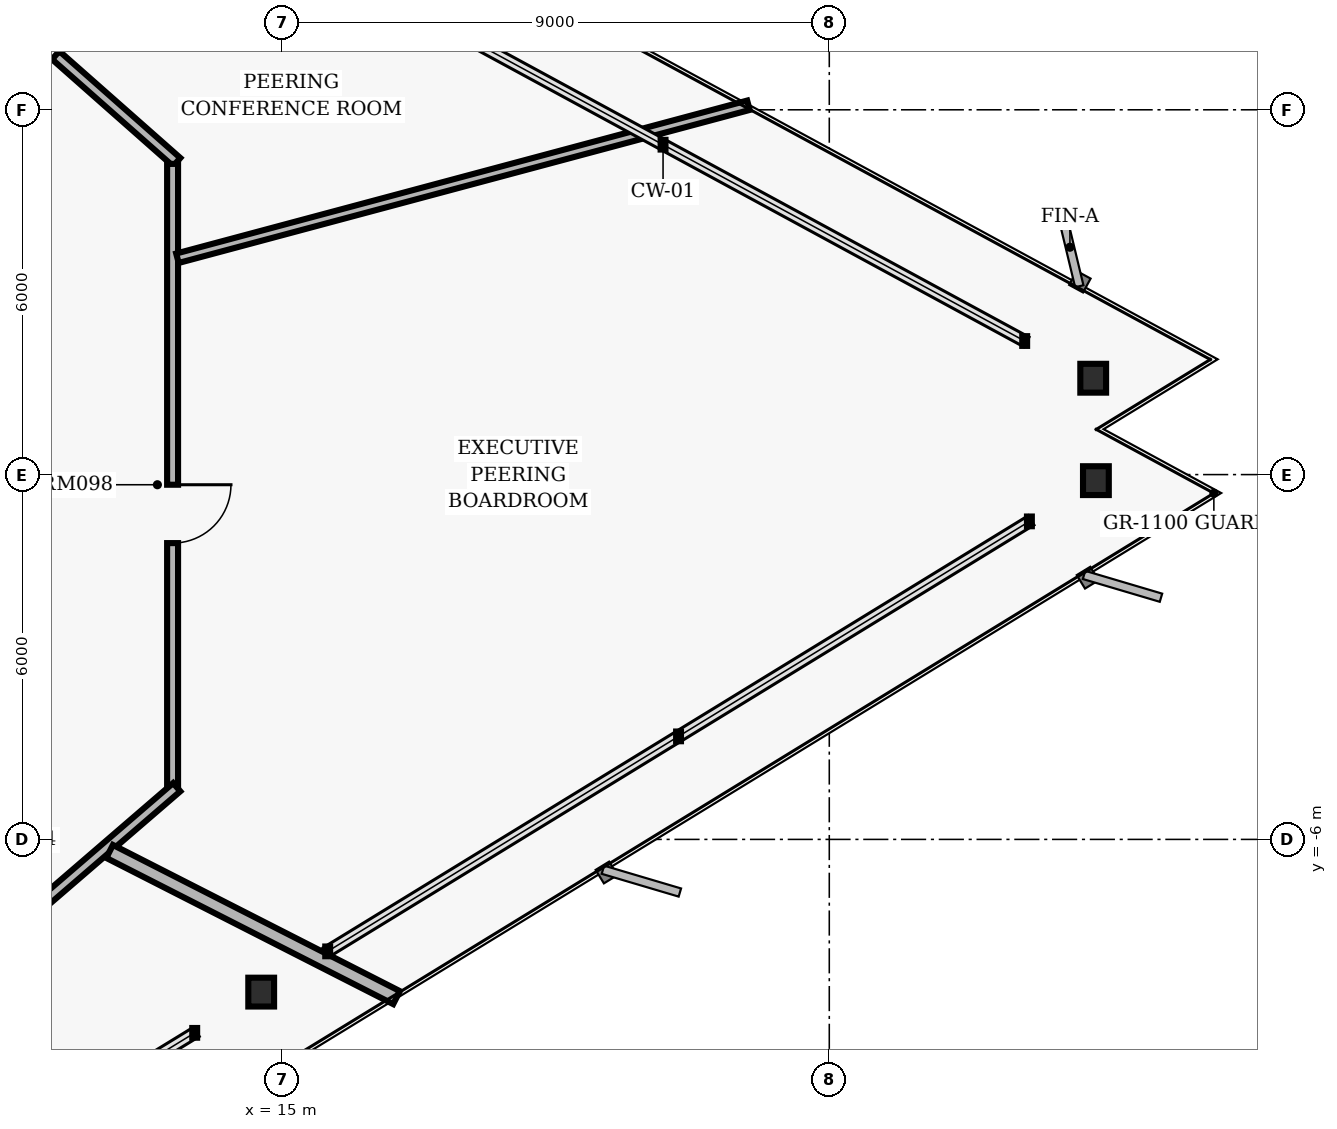
"""IFC4 building model, lengths in metres.
Left out: names, types, materials, properties, quantities, classifications, styles, units other than length and angle.
Written with IfcOpenShell. Run it as: python <this file> out.ifc"""

import sys

from ifc_helpers import new_model, si_unit, direction, frame, frame_2d, origin, origin_2d, place, context, subcontext, project, spatial, rectangle, i_section, extrude, element, fill, save


model = new_model("IFC4")
c1 = context("Model", 3, precision=1e-05, world=origin(), true_north=direction((0.0, 1.0)))
c2 = subcontext(c1, "Body", "Model", "MODEL_VIEW")
j1 = project(units=[si_unit("LENGTHUNIT", "METRE"), si_unit("PLANEANGLEUNIT", "RADIAN")], contexts=[c1])
p1 = place(None, origin())
s1 = spatial("IfcSite", under=j1, at=p1, CompositionType="ELEMENT")
p2 = place(p1, origin())
s2 = spatial("IfcBuilding", under=s1, at=p2, CompositionType="ELEMENT")
p3 = place(p2, frame((0.0, 0.0, 35.68)))
s3 = spatial("IfcBuildingStorey", under=s2, at=p3, CompositionType="ELEMENT", Elevation=35.68)
for number, where, z_axis, x_axis in (
    (1, (28.341, 1.585, 0.0), (0.0, 0.0, 1.0), (1.0, 0.0, 0.0)),
    (2, (14.657, -8.512, 0.0), (0.0, 0.0, 1.0), (1.0, 0.0, 0.0)),
    (3, (28.385, -0.1, 0.0), (0.0, 0.0, 1.0), (1.0, 0.0, 0.0)),
):
    element("IfcColumn", number, at=place(p3, frame(where, z_axis=z_axis, x_axis=x_axis)), inside=s3, PredefinedType="COLUMN", context=c2, shape_type="SweptSolid", body=[
        extrude(i_section(OverallWidth=0.424, OverallDepth=0.474, WebThickness=0.048, FlangeThickness=0.077, FilletRadius=0.025, at=origin_2d()), origin(), (0.0, 0.0, 1.0), 3.36),
    ])
p4 = place(p3, frame((8.567, 9.29, 0.0), z_axis=(0.0, 0.0, 1.0), x_axis=(0.749626463267, -0.66186113768, 0.0)))
e4 = element("IfcWall", 4, at=p4, inside=s3, PredefinedType="PARTITIONING", context=c2, shape_type="SweptSolid", body=[
    extrude(rectangle(XDim=6.27, YDim=0.18, at=frame_2d((3.135, 0.0))), origin(), (0.0, 0.0, 1.0), 2.587),
])
p5 = place(p4, frame((2.655, 0.0, 0.0)))
e5 = element("IfcOpeningElement", 5, at=p5, cuts=e4, PredefinedType="OPENING", context=c2, shape_type="SweptSolid", body=[
    extrude(rectangle(XDim=0.96, YDim=2.02, at=frame_2d((0.48, 1.01))), frame((0.0, 0.1, 0.0), z_axis=(0.0, -1.0, 0.0), x_axis=(1.0, 0.0, 0.0)), (0.0, 0.0, 1.0), 0.2),
])
p6 = place(p3, frame((13.2, 5.11, 0.0), z_axis=(0.0, 0.0, 1.0), x_axis=(0.0, -1.0, 0.0)))
e6 = element("IfcWall", 6, at=p6, inside=s3, PredefinedType="PARTITIONING", context=c2, shape_type="SweptSolid", body=[
    extrude(rectangle(XDim=10.22, YDim=0.18, at=frame_2d((5.11, 0.0))), origin(), (0.0, 0.0, 1.0), 3.073),
])
p7 = place(p6, frame((5.277, 0.0, 0.0)))
e7 = element("IfcOpeningElement", 7, at=p7, cuts=e6, PredefinedType="OPENING", context=c2, shape_type="SweptSolid", body=[
    extrude(rectangle(XDim=0.96, YDim=2.02, at=frame_2d((0.48, 1.01))), frame((0.0, 0.1, 0.0), z_axis=(0.0, -1.0, 0.0), x_axis=(1.0, 0.0, 0.0)), (0.0, 0.0, 1.0), 0.2),
])
p8 = place(p3, frame((13.268, -5.141, 0.0), z_axis=(0.0, 0.0, 1.0), x_axis=(-0.757534501725, -0.65279512766, 0.0)))
e8 = element("IfcWall", 8, at=p8, inside=s3, PredefinedType="PARTITIONING", context=c2, shape_type="SweptSolid", body=[
    extrude(rectangle(XDim=6.385, YDim=0.18, at=frame_2d((3.192, 0.0))), origin(), (0.0, 0.0, 1.0), 2.587),
])
p9 = place(p8, frame((3.316, 0.0, 0.0)))
e9 = element("IfcOpeningElement", 9, at=p9, cuts=e8, PredefinedType="OPENING", context=c2, shape_type="SweptSolid", body=[
    extrude(rectangle(XDim=1.02, YDim=2.02, at=frame_2d((0.51, 1.01))), frame((0.0, 0.1, 0.0), z_axis=(0.0, -1.0, 0.0), x_axis=(1.0, 0.0, 0.0)), (0.0, 0.0, 1.0), 0.2),
])
p10 = place(p3, frame((12.164, -6.198, 0.0), z_axis=(0.0, 0.0, 1.0), x_axis=(0.890999034188, -0.454005199394, 0.0)))
e10 = element("IfcWall", 10, at=p10, inside=s3, PredefinedType="PARTITIONING", context=c2, shape_type="SweptSolid", body=[
    extrude(rectangle(XDim=5.296, YDim=0.24, at=frame_2d((2.648, 0.0))), origin(), (0.0, 0.0, 1.0), 2.358),
])
p11 = place(p3, frame((13.28, 3.558, 0.0), z_axis=(0.0, 0.0, 1.0), x_axis=(0.965926641133, 0.258816004043, 0.0)))
e11 = element("IfcWall", 11, at=p11, inside=s3, PredefinedType="PARTITIONING", context=c2, shape_type="SweptSolid", body=[
    extrude(rectangle(XDim=9.722, YDim=0.16, at=frame_2d((4.861, 0.0))), origin(), (0.0, 0.0, 1.0), 3.073),
])
p12 = place(p7, origin())
e12 = element("IfcDoor", 12, at=p12, inside=s3, OperationType="SINGLE_SWING_LEFT", PredefinedType="DOOR", context=c2, shape_type="SweptSolid", body=[
    extrude(rectangle(XDim=0.96, YDim=2.02, at=frame_2d((0.48, 1.01))), frame((0.0, 0.025, 0.0), z_axis=(0.0, -1.0, 0.0), x_axis=(1.0, 0.0, 0.0)), (0.0, 0.0, 1.0), 0.05),
])
fill(e7, e12)
p13 = place(p5, origin())
e13 = element("IfcDoor", 13, at=p13, inside=s3, OperationType="SINGLE_SWING_RIGHT", PredefinedType="DOOR", context=c2, shape_type="SweptSolid", body=[
    extrude(rectangle(XDim=0.96, YDim=2.02, at=frame_2d((0.48, 1.01))), frame((0.0, 0.025, 0.0), z_axis=(0.0, -1.0, 0.0), x_axis=(1.0, 0.0, 0.0)), (0.0, 0.0, 1.0), 0.05),
])
fill(e5, e13)
save(model, sys.argv[1])
